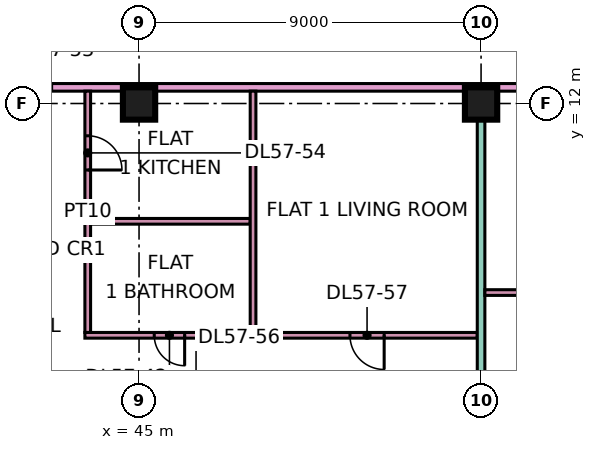
"""IFC4 building model, lengths in metres.
Left out: names, types, materials, properties, quantities, classifications, styles, units other than length and angle.
Written with IfcOpenShell. Run it as: python <this file> out.ifc"""

import sys

from ifc_helpers import new_model, si_unit, direction, frame, frame_2d, origin, origin_2d, place, context, subcontext, project, spatial, rectangle, extrude, element, fill, save


model = new_model("IFC4")
c1 = context("Model", 3, precision=1e-05, world=origin(), true_north=direction((0.0, 1.0)))
c2 = subcontext(c1, "Body", "Model", "MODEL_VIEW")
j1 = project(units=[si_unit("LENGTHUNIT", "METRE"), si_unit("PLANEANGLEUNIT", "RADIAN")], contexts=[c1])
p1 = place(None, origin())
s1 = spatial("IfcSite", under=j1, at=p1, CompositionType="ELEMENT")
p2 = place(p1, origin())
s2 = spatial("IfcBuilding", under=s1, at=p2, CompositionType="ELEMENT")
p3 = place(p2, frame((0.0, 0.0, 241.65)))
s3 = spatial("IfcBuildingStorey", under=s2, at=p3, CompositionType="ELEMENT", Elevation=241.65)
for number, where, z_axis, x_axis in (
    (1, (45.0, 12.0, 0.0), (0.0, 0.0, 1.0), (1.0, 0.0, 0.0)),
    (2, (54.0, 12.0, 0.0), (0.0, 0.0, 1.0), (1.0, 0.0, 0.0)),
):
    element("IfcColumn", number, at=place(p3, frame(where, z_axis=z_axis, x_axis=x_axis)), inside=s3, PredefinedType="COLUMN", context=c2, shape_type="SweptSolid", body=[
        extrude(rectangle(XDim=0.85, YDim=0.85, at=origin_2d()), origin(), (0.0, 0.0, 1.0), 3.75),
    ])
p4 = place(p3, frame((40.65, 12.425, 0.0), z_axis=(0.0, 0.0, 1.0), x_axis=(1.0, 0.0, 0.0)))
e3 = element("IfcWall", 3, at=p4, inside=s3, PredefinedType="PARTITIONING", context=c2, shape_type="SweptSolid", body=[
    extrude(rectangle(XDim=22.35, YDim=0.2, at=frame_2d((11.175, 0.0))), origin(), (0.0, 0.0, 1.0), 3.35),
])
p5 = place(p4, frame((14.7, 0.0, 0.0)))
e4 = element("IfcOpeningElement", 4, at=p5, cuts=e3, PredefinedType="OPENING", context=c2, shape_type="SweptSolid", body=[
    extrude(rectangle(XDim=1.0, YDim=2.1, at=frame_2d((0.5, 1.05))), frame((0.0, 0.11, 0.0), z_axis=(0.0, -1.0, 0.0), x_axis=(1.0, 0.0, 0.0)), (0.0, 0.0, 1.0), 0.22),
])
p6 = place(p4, frame((1.05, 0.0, 0.0)))
e5 = element("IfcOpeningElement", 5, at=p6, cuts=e3, PredefinedType="OPENING", context=c2, shape_type="SweptSolid", body=[
    extrude(rectangle(XDim=1.0, YDim=2.1, at=frame_2d((0.5, 1.05))), frame((0.0, 0.11, 0.0), z_axis=(0.0, -1.0, 0.0), x_axis=(1.0, 0.0, 0.0)), (0.0, 0.0, 1.0), 0.22),
])
p7 = place(p3, frame((43.575, 5.9, 0.0), z_axis=(0.0, 0.0, 1.0), x_axis=(1.0, 0.0, 0.0)))
e6 = element("IfcWall", 6, at=p7, inside=s3, PredefinedType="PARTITIONING", context=c2, shape_type="SweptSolid", body=[
    extrude(rectangle(XDim=10.325, YDim=0.15, at=frame_2d((5.163, 0.0))), origin(), (0.0, 0.0, 1.0), 3.35),
])
p8 = place(p7, frame((1.825, 0.0, 0.0)))
e7 = element("IfcOpeningElement", 7, at=p8, cuts=e6, PredefinedType="OPENING", context=c2, shape_type="SweptSolid", body=[
    extrude(rectangle(XDim=0.8, YDim=2.1, at=frame_2d((0.4, 1.05))), frame((0.0, 0.085, 0.0), z_axis=(0.0, -1.0, 0.0), x_axis=(1.0, 0.0, 0.0)), (0.0, 0.0, 1.0), 0.17),
])
p9 = place(p7, frame((6.975, 0.0, 0.0)))
e8 = element("IfcOpeningElement", 8, at=p9, cuts=e6, PredefinedType="OPENING", context=c2, shape_type="SweptSolid", body=[
    extrude(rectangle(XDim=0.9, YDim=2.1, at=frame_2d((0.45, 1.05))), frame((0.0, 0.085, 0.0), z_axis=(0.0, -1.0, 0.0), x_axis=(1.0, 0.0, 0.0)), (0.0, 0.0, 1.0), 0.17),
])
p10 = place(p3, frame((43.65, 5.975, 0.0), z_axis=(0.0, 0.0, 1.0), x_axis=(0.0, 1.0, 0.0)))
e9 = element("IfcWall", 9, at=p10, inside=s3, PredefinedType="PARTITIONING", context=c2, shape_type="SweptSolid", body=[
    extrude(rectangle(XDim=6.35, YDim=0.15, at=frame_2d((3.175, 0.0))), origin(), (0.0, 0.0, 1.0), 3.35),
])
p11 = place(p10, frame((4.275, 0.0, 0.0)))
e10 = element("IfcOpeningElement", 10, at=p11, cuts=e9, PredefinedType="OPENING", context=c2, shape_type="SweptSolid", body=[
    extrude(rectangle(XDim=0.9, YDim=2.1, at=frame_2d((0.45, 1.05))), frame((0.0, 0.085, 0.0), z_axis=(0.0, -1.0, 0.0), x_axis=(1.0, 0.0, 0.0)), (0.0, 0.0, 1.0), 0.17),
])
p12 = place(p3, frame((43.725, 8.9, 0.0), z_axis=(0.0, 0.0, 1.0), x_axis=(1.0, 0.0, 0.0)))
e11 = element("IfcWall", 11, at=p12, inside=s3, PredefinedType="PARTITIONING", context=c2, shape_type="SweptSolid", body=[
    extrude(rectangle(XDim=4.2, YDim=0.15, at=frame_2d((2.1, 0.0))), origin(), (0.0, 0.0, 1.0), 3.35),
])
p13 = place(p3, frame((48.0, 5.975, 0.0), z_axis=(0.0, 0.0, 1.0), x_axis=(0.0, 1.0, 0.0)))
e12 = element("IfcWall", 12, at=p13, inside=s3, PredefinedType="PARTITIONING", context=c2, shape_type="SweptSolid", body=[
    extrude(rectangle(XDim=6.35, YDim=0.15, at=frame_2d((3.175, 0.0))), origin(), (0.0, 0.0, 1.0), 3.35),
])
p14 = place(p3, frame((54.0, 0.074, 0.0), z_axis=(0.0, 0.0, 1.0), x_axis=(0.0, 1.0, 0.0)))
e13 = element("IfcWall", 13, at=p14, inside=s3, PredefinedType="PARTITIONING", context=c2, shape_type="SweptSolid", body=[
    extrude(rectangle(XDim=12.251, YDim=0.2, at=frame_2d((6.125, 0.0))), origin(), (0.0, 0.0, 1.0), 3.35),
])
p15 = place(p3, frame((54.1, 7.025, 0.0), z_axis=(0.0, 0.0, 1.0), x_axis=(1.0, 0.0, 0.0)))
e14 = element("IfcWall", 14, at=p15, inside=s3, PredefinedType="PARTITIONING", context=c2, shape_type="SweptSolid", body=[
    extrude(rectangle(XDim=5.95, YDim=0.15, at=frame_2d((2.975, 0.0))), origin(), (0.0, 0.0, 1.0), 3.35),
])
p16 = place(p15, frame((3.95, 0.0, 0.0)))
e15 = element("IfcOpeningElement", 15, at=p16, cuts=e14, PredefinedType="OPENING", context=c2, shape_type="SweptSolid", body=[
    extrude(rectangle(XDim=0.9, YDim=2.1, at=frame_2d((0.45, 1.05))), frame((0.0, 0.085, 0.0), z_axis=(0.0, -1.0, 0.0), x_axis=(1.0, 0.0, 0.0)), (0.0, 0.0, 1.0), 0.17),
])
p17 = place(p8, origin())
e16 = element("IfcDoor", 16, at=p17, inside=s3, OperationType="SINGLE_SWING_RIGHT", PredefinedType="DOOR", context=c2, shape_type="SweptSolid", body=[
    extrude(rectangle(XDim=0.8, YDim=2.1, at=frame_2d((0.4, 1.05))), frame((0.0, 0.025, 0.0), z_axis=(0.0, -1.0, 0.0), x_axis=(1.0, 0.0, 0.0)), (0.0, 0.0, 1.0), 0.05),
])
fill(e7, e16)
p18 = place(p11, frame((0.9, 0.0, 0.0), z_axis=(0.0, 0.0, 1.0), x_axis=(-1.0, 0.0, 0.0)))
e17 = element("IfcDoor", 17, at=p18, inside=s3, OperationType="SINGLE_SWING_LEFT", PredefinedType="DOOR", context=c2, shape_type="SweptSolid", body=[
    extrude(rectangle(XDim=0.9, YDim=2.1, at=frame_2d((0.45, 1.05))), frame((0.0, 0.025, 0.0), z_axis=(0.0, -1.0, 0.0), x_axis=(1.0, 0.0, 0.0)), (0.0, 0.0, 1.0), 0.05),
])
fill(e10, e17)
p19 = place(p9, origin())
e18 = element("IfcDoor", 18, at=p19, inside=s3, OperationType="SINGLE_SWING_RIGHT", PredefinedType="DOOR", context=c2, shape_type="SweptSolid", body=[
    extrude(rectangle(XDim=0.9, YDim=2.1, at=frame_2d((0.45, 1.05))), frame((0.0, 0.025, 0.0), z_axis=(0.0, -1.0, 0.0), x_axis=(1.0, 0.0, 0.0)), (0.0, 0.0, 1.0), 0.05),
])
fill(e8, e18)
save(model, sys.argv[1])
